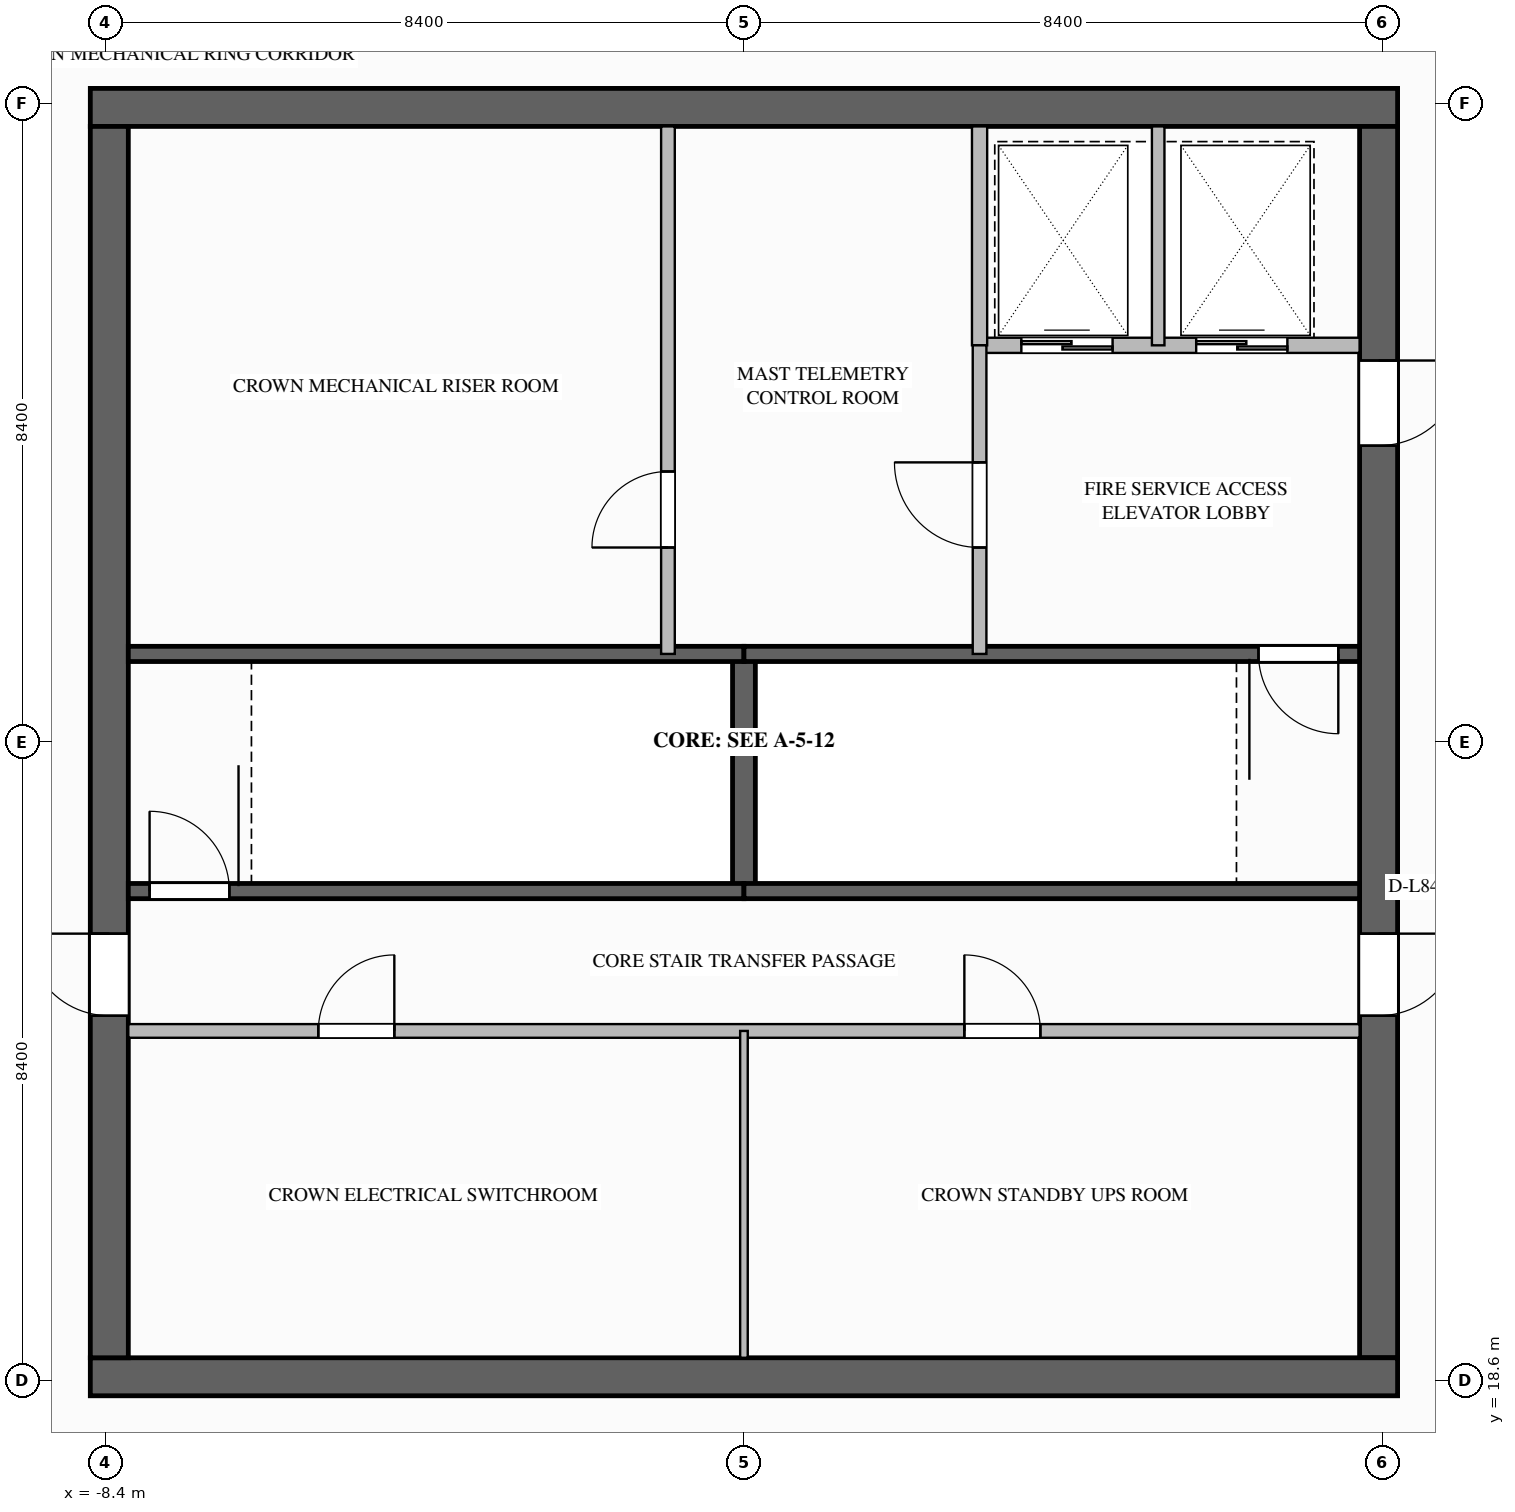
"""IFC4 building model, lengths in metres.
Left out: names, types, materials, properties, quantities, classifications, styles, units other than length and angle.
Written with IfcOpenShell. Run it as: python <this file> out.ifc"""

import sys

from ifc_helpers import new_model, si_unit, direction, frame, frame_2d, origin, place, context, subcontext, project, spatial, rectangle, extrude, element, fill, save


model = new_model("IFC4")
c1 = context("Model", 3, precision=1e-05, world=origin(), true_north=direction((0.0, 1.0)))
c2 = subcontext(c1, "Body", "Model", "MODEL_VIEW")
j1 = project(units=[si_unit("LENGTHUNIT", "METRE"), si_unit("PLANEANGLEUNIT", "RADIAN")], contexts=[c1])
p1 = place(None, origin())
s1 = spatial("IfcSite", under=j1, at=p1, CompositionType="ELEMENT")
p2 = place(p1, origin())
s2 = spatial("IfcBuilding", under=s1, at=p2, CompositionType="ELEMENT")
p3 = place(p2, frame((0.0, 0.0, 323.2)))
s3 = spatial("IfcBuildingStorey", under=s2, at=p3, CompositionType="ELEMENT", Elevation=323.2)
p4 = place(p3, frame((-8.6, 35.35, 0.0), z_axis=(0.0, 0.0, 1.0), x_axis=(1.0, 0.0, 0.0)))
e1 = element("IfcWall", 1, at=p4, inside=s3, PredefinedType="SHEAR", context=c2, shape_type="SweptSolid", body=[
    extrude(rectangle(XDim=17.2, YDim=0.5, at=frame_2d((8.6, 0.0))), origin(), (0.0, 0.0, 1.0), 3.42),
])
p5 = place(p3, frame((8.35, 35.1, 0.0), z_axis=(0.0, 0.0, 1.0), x_axis=(0.0, -1.0, 0.0)))
e2 = element("IfcWall", 2, at=p5, inside=s3, PredefinedType="SHEAR", context=c2, shape_type="SweptSolid", body=[
    extrude(rectangle(XDim=16.2, YDim=0.5, at=frame_2d((8.1, 0.0))), origin(), (0.0, 0.0, 1.0), 3.42),
])
p6 = place(p5, frame((3.08, 0.0, 0.0)))
e3 = element("IfcOpeningElement", 3, at=p6, cuts=e2, PredefinedType="OPENING", context=c2, shape_type="SweptSolid", body=[
    extrude(rectangle(XDim=1.12, YDim=2.1, at=frame_2d((0.56, 1.05))), frame((0.0, 0.26, 0.0), z_axis=(0.0, -1.0, 0.0), x_axis=(1.0, 0.0, 0.0)), (0.0, 0.0, 1.0), 0.52),
])
p7 = place(p5, frame((10.62, 0.0, 0.0)))
e4 = element("IfcOpeningElement", 4, at=p7, cuts=e2, PredefinedType="OPENING", context=c2, shape_type="SweptSolid", body=[
    extrude(rectangle(XDim=1.08, YDim=2.04, at=frame_2d((0.54, 1.02))), frame((0.0, 0.26, 0.0), z_axis=(0.0, -1.0, 0.0), x_axis=(1.0, 0.0, 0.0)), (0.0, 0.0, 1.0), 0.52),
])
p8 = place(p3, frame((8.6, 18.65, 0.0), z_axis=(0.0, 0.0, 1.0), x_axis=(-1.0, 0.0, 0.0)))
e5 = element("IfcWall", 5, at=p8, inside=s3, PredefinedType="SHEAR", context=c2, shape_type="SweptSolid", body=[
    extrude(rectangle(XDim=17.2, YDim=0.5, at=frame_2d((8.6, 0.0))), origin(), (0.0, 0.0, 1.0), 3.42),
])
p9 = place(p3, frame((-8.35, 18.9, 0.0), z_axis=(0.0, 0.0, 1.0), x_axis=(0.0, 1.0, 0.0)))
e6 = element("IfcWall", 6, at=p9, inside=s3, PredefinedType="SHEAR", context=c2, shape_type="SweptSolid", body=[
    extrude(rectangle(XDim=16.2, YDim=0.5, at=frame_2d((8.1, 0.0))), origin(), (0.0, 0.0, 1.0), 3.42),
])
p10 = place(p9, frame((4.5, 0.0, 0.0)))
e7 = element("IfcOpeningElement", 7, at=p10, cuts=e6, PredefinedType="OPENING", context=c2, shape_type="SweptSolid", body=[
    extrude(rectangle(XDim=1.08, YDim=2.04, at=frame_2d((0.54, 1.02))), frame((0.0, 0.26, 0.0), z_axis=(0.0, -1.0, 0.0), x_axis=(1.0, 0.0, 0.0)), (0.0, 0.0, 1.0), 0.52),
])
p11 = place(p3, frame((0.0, 25.04, 0.0), z_axis=(0.0, 0.0, 1.0), x_axis=(0.0, 1.0, 0.0)))
e8 = element("IfcWall", 8, at=p11, inside=s3, PredefinedType="SOLIDWALL", context=c2, shape_type="SweptSolid", body=[
    extrude(rectangle(XDim=3.12, YDim=0.3, at=frame_2d((1.56, 0.0))), origin(), (0.0, 0.0, 1.0), 3.42),
])
p12 = place(p3, frame((-8.1, 25.04, 0.0), z_axis=(0.0, 0.0, 1.0), x_axis=(1.0, 0.0, 0.0)))
e9 = element("IfcWall", 9, at=p12, inside=s3, PredefinedType="SOLIDWALL", context=c2, shape_type="SweptSolid", body=[
    extrude(rectangle(XDim=8.1, YDim=0.2, at=frame_2d((4.05, 0.0))), origin(), (0.0, 0.0, 1.0), 3.42),
])
p13 = place(p12, frame((0.28, 0.0, 0.0)))
e10 = element("IfcOpeningElement", 10, at=p13, cuts=e9, PredefinedType="OPENING", context=c2, shape_type="SweptSolid", body=[
    extrude(rectangle(XDim=1.05, YDim=2.1, at=frame_2d((0.525, 1.05))), frame((0.0, 0.11, 0.0), z_axis=(0.0, -1.0, 0.0), x_axis=(1.0, 0.0, 0.0)), (0.0, 0.0, 1.0), 0.22),
])
for number, where, z_axis, x_axis in (
    (11, (-8.1, 28.16, 0.0), (0.0, 0.0, 1.0), (1.0, 0.0, 0.0)),
    (12, (0.0, 25.04, 0.0), (0.0, 0.0, 1.0), (1.0, 0.0, 0.0)),
):
    element("IfcWall", number, at=place(p3, frame(where, z_axis=z_axis, x_axis=x_axis)), inside=s3, PredefinedType="SOLIDWALL", context=c2, shape_type="SweptSolid", body=[
        extrude(rectangle(XDim=8.1, YDim=0.2, at=frame_2d((4.05, 0.0))), origin(), (0.0, 0.0, 1.0), 3.42),
    ])
p14 = place(p3, frame((8.1, 28.16, 0.0), z_axis=(0.0, 0.0, 1.0), x_axis=(-1.0, 0.0, 0.0)))
e13 = element("IfcWall", 13, at=p14, inside=s3, PredefinedType="SOLIDWALL", context=c2, shape_type="SweptSolid", body=[
    extrude(rectangle(XDim=8.1, YDim=0.2, at=frame_2d((4.05, 0.0))), origin(), (0.0, 0.0, 1.0), 3.42),
])
p15 = place(p14, frame((0.28, 0.0, 0.0)))
e14 = element("IfcOpeningElement", 14, at=p15, cuts=e13, PredefinedType="OPENING", context=c2, shape_type="SweptSolid", body=[
    extrude(rectangle(XDim=1.05, YDim=2.1, at=frame_2d((0.525, 1.05))), frame((0.0, 0.11, 0.0), z_axis=(0.0, -1.0, 0.0), x_axis=(1.0, 0.0, 0.0)), (0.0, 0.0, 1.0), 0.22),
])
p16 = place(p3, frame((3.1, 32.22, 0.0), z_axis=(0.0, 0.0, 1.0), x_axis=(1.0, 0.0, 0.0)))
e15 = element("IfcWall", 15, at=p16, inside=s3, PredefinedType="SOLIDWALL", context=c2, shape_type="SweptSolid", body=[
    extrude(rectangle(XDim=5.0, YDim=0.2, at=frame_2d((2.5, 0.0))), origin(), (0.0, 0.0, 1.0), 3.42),
])
p17 = place(p16, frame((0.55, 0.0, 0.0)))
e16 = element("IfcOpeningElement", 16, at=p17, cuts=e15, PredefinedType="OPENING", context=c2, shape_type="SweptSolid", body=[
    extrude(rectangle(XDim=1.2, YDim=2.2, at=frame_2d((0.6, 1.1))), frame((0.0, 0.11, 0.0), z_axis=(0.0, -1.0, 0.0), x_axis=(1.0, 0.0, 0.0)), (0.0, 0.0, 1.0), 0.22),
])
p18 = place(p16, frame((2.85, 0.0, 0.0)))
e17 = element("IfcOpeningElement", 17, at=p18, cuts=e15, PredefinedType="OPENING", context=c2, shape_type="SweptSolid", body=[
    extrude(rectangle(XDim=1.2, YDim=2.2, at=frame_2d((0.6, 1.1))), frame((0.0, 0.11, 0.0), z_axis=(0.0, -1.0, 0.0), x_axis=(1.0, 0.0, 0.0)), (0.0, 0.0, 1.0), 0.22),
])
p19 = place(p3, frame((3.1, 32.22, 0.0), z_axis=(0.0, 0.0, 1.0), x_axis=(0.0, 1.0, 0.0)))
e18 = element("IfcWall", 18, at=p19, inside=s3, PredefinedType="SOLIDWALL", context=c2, shape_type="SweptSolid", body=[
    extrude(rectangle(XDim=2.88, YDim=0.2, at=frame_2d((1.44, 0.0))), origin(), (0.0, 0.0, 1.0), 3.42),
])
p20 = place(p3, frame((5.45, 32.22, 0.0), z_axis=(0.0, 0.0, 1.0), x_axis=(0.0, 1.0, 0.0)))
e19 = element("IfcWall", 19, at=p20, inside=s3, PredefinedType="PARTITIONING", context=c2, shape_type="SweptSolid", body=[
    extrude(rectangle(XDim=2.88, YDim=0.165, at=frame_2d((1.44, 0.0))), origin(), (0.0, 0.0, 1.0), 3.42),
])
p21 = place(p3, frame((3.1, 28.16, 0.0), z_axis=(0.0, 0.0, 1.0), x_axis=(0.0, 1.0, 0.0)))
e20 = element("IfcWall", 20, at=p21, inside=s3, PredefinedType="SOLIDWALL", context=c2, shape_type="SweptSolid", body=[
    extrude(rectangle(XDim=4.06, YDim=0.18, at=frame_2d((2.03, 0.0))), origin(), (0.0, 0.0, 1.0), 3.42),
])
p22 = place(p21, frame((1.4, 0.0, 0.0)))
e21 = element("IfcOpeningElement", 21, at=p22, cuts=e20, PredefinedType="OPENING", context=c2, shape_type="SweptSolid", body=[
    extrude(rectangle(XDim=1.12, YDim=2.1, at=frame_2d((0.56, 1.05))), frame((0.0, 0.1, 0.0), z_axis=(0.0, -1.0, 0.0), x_axis=(1.0, 0.0, 0.0)), (0.0, 0.0, 1.0), 0.2),
])
p23 = place(p3, frame((-1.0, 28.16, 0.0), z_axis=(0.0, 0.0, 1.0), x_axis=(0.0, 1.0, 0.0)))
e22 = element("IfcWall", 22, at=p23, inside=s3, PredefinedType="SOLIDWALL", context=c2, shape_type="SweptSolid", body=[
    extrude(rectangle(XDim=6.94, YDim=0.18, at=frame_2d((3.47, 0.0))), origin(), (0.0, 0.0, 1.0), 3.42),
])
p24 = place(p23, frame((1.4, 0.0, 0.0)))
e23 = element("IfcOpeningElement", 23, at=p24, cuts=e22, PredefinedType="OPENING", context=c2, shape_type="SweptSolid", body=[
    extrude(rectangle(XDim=1.0, YDim=2.1, at=frame_2d((0.5, 1.05))), frame((0.0, 0.1, 0.0), z_axis=(0.0, -1.0, 0.0), x_axis=(1.0, 0.0, 0.0)), (0.0, 0.0, 1.0), 0.2),
])
p25 = place(p3, frame((-8.1, 23.2, 0.0), z_axis=(0.0, 0.0, 1.0), x_axis=(1.0, 0.0, 0.0)))
e24 = element("IfcWall", 24, at=p25, inside=s3, PredefinedType="SOLIDWALL", context=c2, shape_type="SweptSolid", body=[
    extrude(rectangle(XDim=16.2, YDim=0.18, at=frame_2d((8.1, 0.0))), origin(), (0.0, 0.0, 1.0), 2.368),
])
p26 = place(p25, frame((2.5, 0.0, 0.0)))
e25 = element("IfcOpeningElement", 25, at=p26, cuts=e24, PredefinedType="OPENING", context=c2, shape_type="SweptSolid", body=[
    extrude(rectangle(XDim=1.0, YDim=2.1, at=frame_2d((0.5, 1.05))), frame((0.0, 0.1, 0.0), z_axis=(0.0, -1.0, 0.0), x_axis=(1.0, 0.0, 0.0)), (0.0, 0.0, 1.0), 0.2),
])
p27 = place(p25, frame((11.0, 0.0, 0.0)))
e26 = element("IfcOpeningElement", 26, at=p27, cuts=e24, PredefinedType="OPENING", context=c2, shape_type="SweptSolid", body=[
    extrude(rectangle(XDim=1.0, YDim=2.1, at=frame_2d((0.5, 1.05))), frame((0.0, 0.1, 0.0), z_axis=(0.0, -1.0, 0.0), x_axis=(1.0, 0.0, 0.0)), (0.0, 0.0, 1.0), 0.2),
])
p28 = place(p3, frame((0.0, 18.9, 0.0), z_axis=(0.0, 0.0, 1.0), x_axis=(0.0, 1.0, 0.0)))
e27 = element("IfcWall", 27, at=p28, inside=s3, PredefinedType="PARTITIONING", context=c2, shape_type="SweptSolid", body=[
    extrude(rectangle(XDim=4.3, YDim=0.1, at=frame_2d((2.15, 0.0))), origin(), (0.0, 0.0, 1.0), 3.42),
])
p29 = place(p13, origin())
e28 = element("IfcDoor", 28, at=p29, inside=s3, OperationType="SINGLE_SWING_LEFT", PredefinedType="DOOR", context=c2, shape_type="SweptSolid", body=[
    extrude(rectangle(XDim=1.05, YDim=2.1, at=frame_2d((0.525, 1.05))), frame((0.0, 0.025, 0.0), z_axis=(0.0, -1.0, 0.0), x_axis=(1.0, 0.0, 0.0)), (0.0, 0.0, 1.0), 0.05),
])
fill(e10, e28)
p30 = place(p15, origin())
e29 = element("IfcDoor", 29, at=p30, inside=s3, OperationType="SINGLE_SWING_LEFT", PredefinedType="DOOR", context=c2, shape_type="SweptSolid", body=[
    extrude(rectangle(XDim=1.05, YDim=2.1, at=frame_2d((0.525, 1.05))), frame((0.0, 0.025, 0.0), z_axis=(0.0, -1.0, 0.0), x_axis=(1.0, 0.0, 0.0)), (0.0, 0.0, 1.0), 0.05),
])
fill(e14, e29)
p31 = place(p17, origin())
e30 = element("IfcDoor", 30, at=p31, inside=s3, OperationType="SLIDING_TO_LEFT", PredefinedType="DOOR", context=c2, shape_type="SweptSolid", body=[
    extrude(rectangle(XDim=1.2, YDim=2.2, at=frame_2d((0.6, 1.1))), frame((0.0, 0.025, 0.0), z_axis=(0.0, -1.0, 0.0), x_axis=(1.0, 0.0, 0.0)), (0.0, 0.0, 1.0), 0.05),
])
fill(e16, e30)
p32 = place(p18, origin())
e31 = element("IfcDoor", 31, at=p32, inside=s3, OperationType="SLIDING_TO_LEFT", PredefinedType="DOOR", context=c2, shape_type="SweptSolid", body=[
    extrude(rectangle(XDim=1.2, YDim=2.2, at=frame_2d((0.6, 1.1))), frame((0.0, 0.025, 0.0), z_axis=(0.0, -1.0, 0.0), x_axis=(1.0, 0.0, 0.0)), (0.0, 0.0, 1.0), 0.05),
])
fill(e17, e31)
p33 = place(p22, origin())
e32 = element("IfcDoor", 32, at=p33, inside=s3, OperationType="SINGLE_SWING_RIGHT", PredefinedType="DOOR", context=c2, shape_type="SweptSolid", body=[
    extrude(rectangle(XDim=1.12, YDim=2.1, at=frame_2d((0.56, 1.05))), frame((0.0, 0.025, 0.0), z_axis=(0.0, -1.0, 0.0), x_axis=(1.0, 0.0, 0.0)), (0.0, 0.0, 1.0), 0.05),
])
fill(e21, e32)
p34 = place(p6, origin())
e33 = element("IfcDoor", 33, at=p34, inside=s3, OperationType="SINGLE_SWING_LEFT", PredefinedType="DOOR", context=c2, shape_type="SweptSolid", body=[
    extrude(rectangle(XDim=1.12, YDim=2.1, at=frame_2d((0.56, 1.05))), frame((0.0, 0.025, 0.0), z_axis=(0.0, -1.0, 0.0), x_axis=(1.0, 0.0, 0.0)), (0.0, 0.0, 1.0), 0.05),
])
fill(e3, e33)
p35 = place(p24, origin())
e34 = element("IfcDoor", 34, at=p35, inside=s3, OperationType="SINGLE_SWING_LEFT", PredefinedType="DOOR", context=c2, shape_type="SweptSolid", body=[
    extrude(rectangle(XDim=1.0, YDim=2.1, at=frame_2d((0.5, 1.05))), frame((0.0, 0.025, 0.0), z_axis=(0.0, -1.0, 0.0), x_axis=(1.0, 0.0, 0.0)), (0.0, 0.0, 1.0), 0.05),
])
fill(e23, e34)
p36 = place(p10, origin())
e35 = element("IfcDoor", 35, at=p36, inside=s3, OperationType="SINGLE_SWING_RIGHT", PredefinedType="DOOR", context=c2, shape_type="SweptSolid", body=[
    extrude(rectangle(XDim=1.08, YDim=2.04, at=frame_2d((0.54, 1.02))), frame((0.0, 0.025, 0.0), z_axis=(0.0, -1.0, 0.0), x_axis=(1.0, 0.0, 0.0)), (0.0, 0.0, 1.0), 0.05),
])
fill(e7, e35)
p37 = place(p7, origin())
e36 = element("IfcDoor", 36, at=p37, inside=s3, OperationType="SINGLE_SWING_LEFT", PredefinedType="DOOR", context=c2, shape_type="SweptSolid", body=[
    extrude(rectangle(XDim=1.08, YDim=2.04, at=frame_2d((0.54, 1.02))), frame((0.0, 0.025, 0.0), z_axis=(0.0, -1.0, 0.0), x_axis=(1.0, 0.0, 0.0)), (0.0, 0.0, 1.0), 0.05),
])
fill(e4, e36)
p38 = place(p26, origin())
e37 = element("IfcDoor", 37, at=p38, inside=s3, OperationType="SINGLE_SWING_RIGHT", PredefinedType="DOOR", context=c2, shape_type="SweptSolid", body=[
    extrude(rectangle(XDim=1.0, YDim=2.1, at=frame_2d((0.5, 1.05))), frame((0.0, 0.025, 0.0), z_axis=(0.0, -1.0, 0.0), x_axis=(1.0, 0.0, 0.0)), (0.0, 0.0, 1.0), 0.05),
])
fill(e25, e37)
p39 = place(p27, origin())
e38 = element("IfcDoor", 38, at=p39, inside=s3, OperationType="SINGLE_SWING_LEFT", PredefinedType="DOOR", context=c2, shape_type="SweptSolid", body=[
    extrude(rectangle(XDim=1.0, YDim=2.1, at=frame_2d((0.5, 1.05))), frame((0.0, 0.025, 0.0), z_axis=(0.0, -1.0, 0.0), x_axis=(1.0, 0.0, 0.0)), (0.0, 0.0, 1.0), 0.05),
])
fill(e26, e38)
save(model, sys.argv[1])
